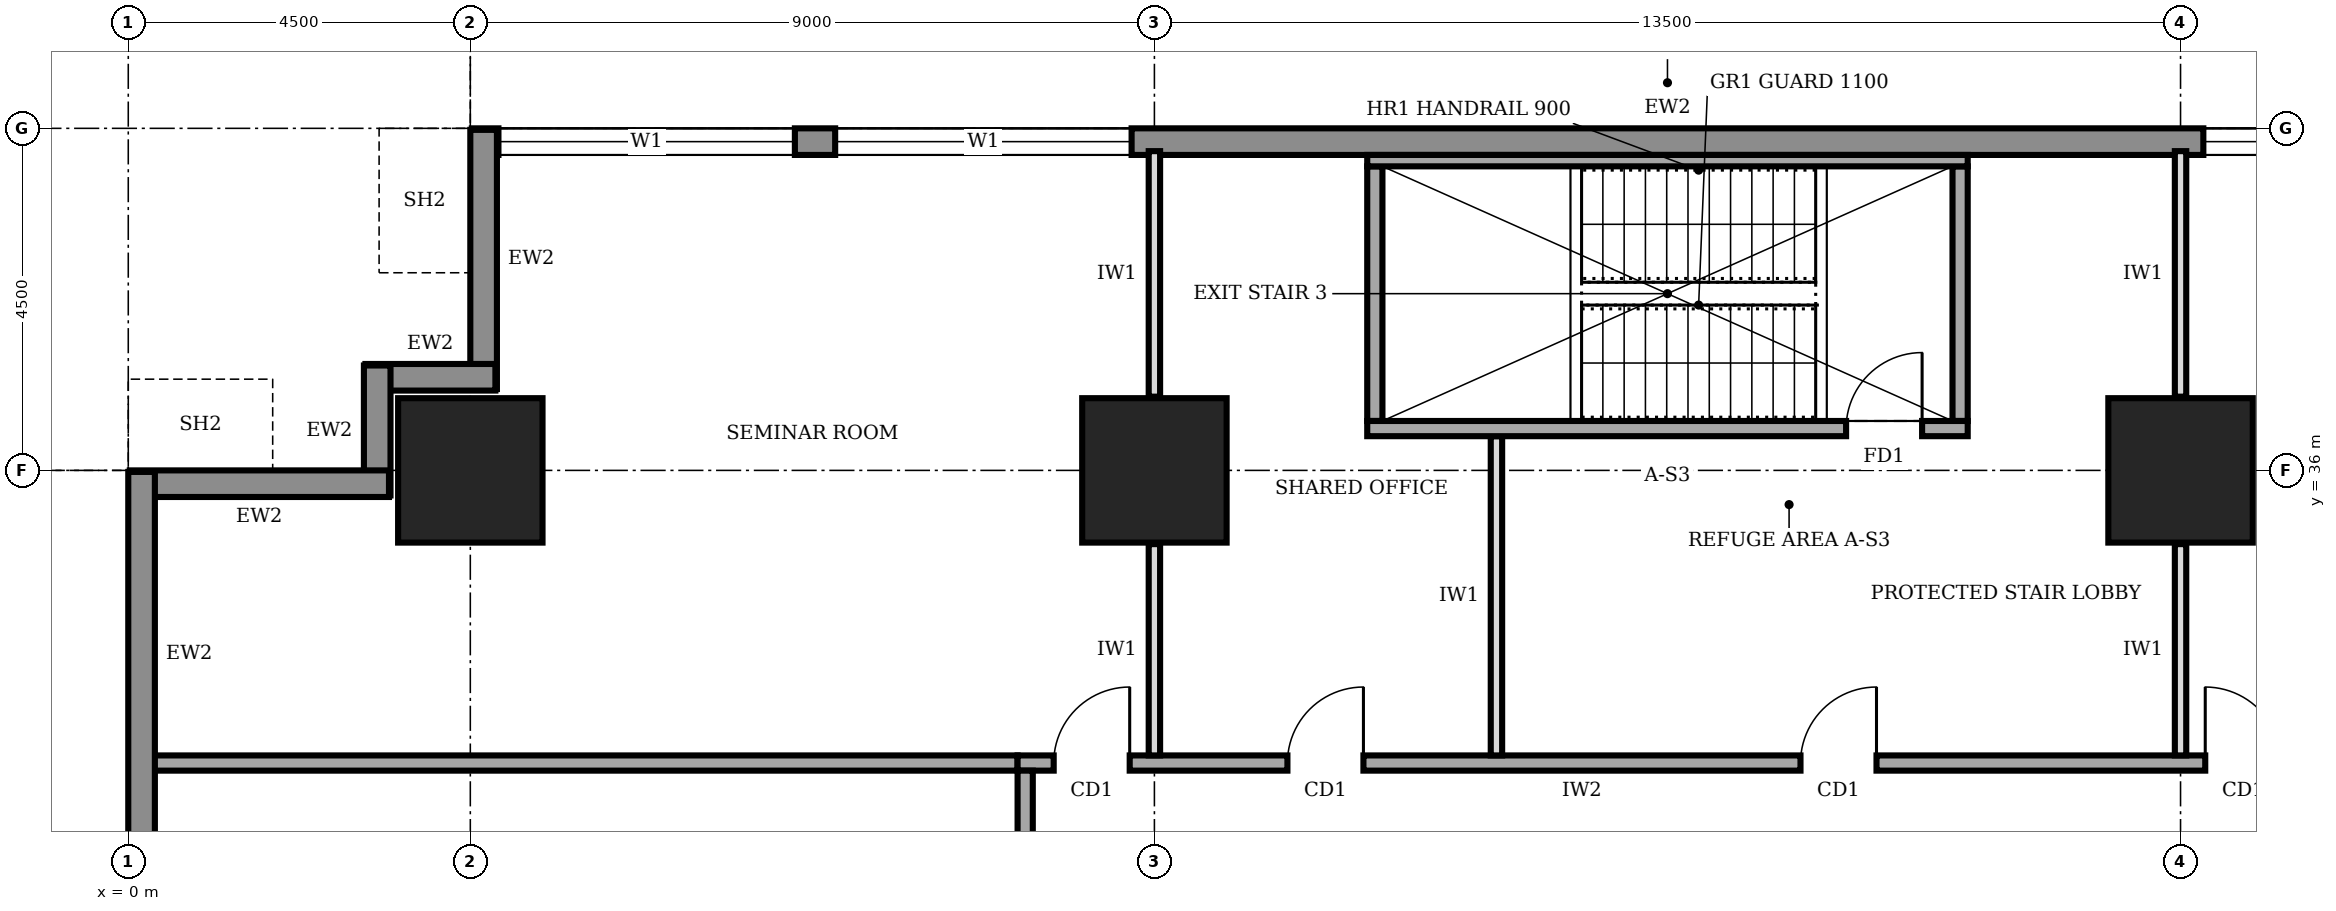
"""IFC4 building model, lengths in metres.
Left out: names, types, materials, properties, quantities, classifications, styles, units other than length and angle.
Written with IfcOpenShell. Run it as: python <this file> out.ifc"""

import sys

from ifc_helpers import new_model, si_unit, direction, frame, frame_2d, origin, origin_2d, place, context, subcontext, project, spatial, rectangle, extrude, element, fill, save


model = new_model("IFC4")
c1 = context("Model", 3, precision=1e-05, world=origin(), true_north=direction((0.0, 1.0)))
c2 = subcontext(c1, "Body", "Model", "MODEL_VIEW")
j1 = project(units=[si_unit("LENGTHUNIT", "METRE"), si_unit("PLANEANGLEUNIT", "RADIAN")], contexts=[c1])
p1 = place(None, origin())
s1 = spatial("IfcSite", under=j1, at=p1, CompositionType="ELEMENT")
p2 = place(p1, origin())
s2 = spatial("IfcBuilding", under=s1, at=p2, CompositionType="ELEMENT")
p3 = place(p2, frame((0.0, 0.0, 109.0)))
s3 = spatial("IfcBuildingStorey", under=s2, at=p3, CompositionType="ELEMENT", Elevation=109.0)
for number, where, z_axis, x_axis in (
    (1, (4.5, 36.0, 0.0), (0.0, 0.0, 1.0), (1.0, 0.0, 0.0)),
    (2, (13.5, 36.0, 0.0), (0.0, 0.0, 1.0), (1.0, 0.0, 0.0)),
    (3, (27.0, 36.0, 0.0), (0.0, 0.0, 1.0), (1.0, 0.0, 0.0)),
):
    element("IfcColumn", number, at=place(p3, frame(where, z_axis=z_axis, x_axis=x_axis)), inside=s3, PredefinedType="COLUMN", context=c2, shape_type="SweptSolid", body=[
        extrude(rectangle(XDim=1.9, YDim=1.9, at=origin_2d()), origin(), (0.0, 0.0, 1.0), 4.0),
    ])
p4 = place(p3, frame((35.98, 40.325, 0.0), z_axis=(0.0, 0.0, 1.0), x_axis=(-1.0, 0.0, 0.0)))
e4 = element("IfcWall", 4, at=p4, inside=s3, PredefinedType="STANDARD", context=c2, shape_type="SweptSolid", body=[
    extrude(rectangle(XDim=31.46, YDim=0.35, at=frame_2d((15.73, 0.0))), origin(), (0.0, 0.0, 1.0), 3.75),
])
p5 = place(p4, frame((27.21, 0.0, 0.9)))
e5 = element("IfcOpeningElement", 5, at=p5, cuts=e4, PredefinedType="OPENING", context=c2, shape_type="SweptSolid", body=[
    extrude(rectangle(XDim=3.9, YDim=2.2, at=frame_2d((1.95, 1.1))), frame((0.0, 0.185, 0.0), z_axis=(0.0, -1.0, 0.0), x_axis=(1.0, 0.0, 0.0)), (0.0, 0.0, 1.0), 0.37),
])
p6 = place(p4, frame((22.78, 0.0, 0.9)))
e6 = element("IfcOpeningElement", 6, at=p6, cuts=e4, PredefinedType="OPENING", context=c2, shape_type="SweptSolid", body=[
    extrude(rectangle(XDim=3.9, YDim=2.2, at=frame_2d((1.95, 1.1))), frame((0.0, 0.185, 0.0), z_axis=(0.0, -1.0, 0.0), x_axis=(1.0, 0.0, 0.0)), (0.0, 0.0, 1.0), 0.37),
])
p7 = place(p4, frame((4.78, 0.0, 0.9)))
e7 = element("IfcOpeningElement", 7, at=p7, cuts=e4, PredefinedType="OPENING", context=c2, shape_type="SweptSolid", body=[
    extrude(rectangle(XDim=3.9, YDim=2.2, at=frame_2d((1.95, 1.1))), frame((0.0, 0.185, 0.0), z_axis=(0.0, -1.0, 0.0), x_axis=(1.0, 0.0, 0.0)), (0.0, 0.0, 1.0), 0.37),
])
p8 = place(p3, frame((4.675, 40.48, 0.0), z_axis=(0.0, 0.0, 1.0), x_axis=(0.0, -1.0, 0.0)))
e8 = element("IfcWall", 8, at=p8, inside=s3, PredefinedType="STANDARD", context=c2, shape_type="SweptSolid", body=[
    extrude(rectangle(XDim=3.41, YDim=0.35, at=frame_2d((1.705, 0.0))), origin(), (0.0, 0.0, 1.0), 2.85),
])
for number, where, z_axis, x_axis in (
    (9, (4.83, 37.225, 0.0), (0.0, 0.0, 1.0), (-1.0, 0.0, 0.0)),
    (10, (3.275, 37.38, 0.0), (0.0, 0.0, 1.0), (0.0, -1.0, 0.0)),
):
    element("IfcWall", number, at=place(p3, frame(where, z_axis=z_axis, x_axis=x_axis)), inside=s3, PredefinedType="STANDARD", context=c2, shape_type="SweptSolid", body=[
        extrude(rectangle(XDim=1.71, YDim=0.35, at=frame_2d((0.855, 0.0))), origin(), (0.0, 0.0, 1.0), 3.75),
    ])
p9 = place(p3, frame((3.43, 35.825, 0.0), z_axis=(0.0, 0.0, 1.0), x_axis=(-1.0, 0.0, 0.0)))
e11 = element("IfcWall", 11, at=p9, inside=s3, PredefinedType="STANDARD", context=c2, shape_type="SweptSolid", body=[
    extrude(rectangle(XDim=3.41, YDim=0.35, at=frame_2d((1.705, 0.0))), origin(), (0.0, 0.0, 1.0), 2.85),
])
p10 = place(p3, frame((0.175, 35.98, 0.0), z_axis=(0.0, 0.0, 1.0), x_axis=(0.0, -1.0, 0.0)))
e12 = element("IfcWall", 12, at=p10, inside=s3, PredefinedType="STANDARD", context=c2, shape_type="SweptSolid", body=[
    extrude(rectangle(XDim=31.46, YDim=0.35, at=frame_2d((15.73, 0.0))), origin(), (0.0, 0.0, 1.0), 3.75),
])
p11 = place(p10, frame((27.21, 0.0, 0.9)))
e13 = element("IfcOpeningElement", 13, at=p11, cuts=e12, PredefinedType="OPENING", context=c2, shape_type="SweptSolid", body=[
    extrude(rectangle(XDim=3.9, YDim=2.2, at=frame_2d((1.95, 1.1))), frame((0.0, 0.185, 0.0), z_axis=(0.0, -1.0, 0.0), x_axis=(1.0, 0.0, 0.0)), (0.0, 0.0, 1.0), 0.37),
])
p12 = place(p10, frame((22.78, 0.0, 0.9)))
e14 = element("IfcOpeningElement", 14, at=p12, cuts=e12, PredefinedType="OPENING", context=c2, shape_type="SweptSolid", body=[
    extrude(rectangle(XDim=3.9, YDim=2.2, at=frame_2d((1.95, 1.1))), frame((0.0, 0.185, 0.0), z_axis=(0.0, -1.0, 0.0), x_axis=(1.0, 0.0, 0.0)), (0.0, 0.0, 1.0), 0.37),
])
p13 = place(p10, frame((18.28, 0.0, 0.9)))
e15 = element("IfcOpeningElement", 15, at=p13, cuts=e12, PredefinedType="OPENING", context=c2, shape_type="SweptSolid", body=[
    extrude(rectangle(XDim=3.9, YDim=2.2, at=frame_2d((1.95, 1.1))), frame((0.0, 0.185, 0.0), z_axis=(0.0, -1.0, 0.0), x_axis=(1.0, 0.0, 0.0)), (0.0, 0.0, 1.0), 0.37),
])
p14 = place(p10, frame((13.78, 0.0, 0.9)))
e16 = element("IfcOpeningElement", 16, at=p14, cuts=e12, PredefinedType="OPENING", context=c2, shape_type="SweptSolid", body=[
    extrude(rectangle(XDim=3.9, YDim=2.2, at=frame_2d((1.95, 1.1))), frame((0.0, 0.185, 0.0), z_axis=(0.0, -1.0, 0.0), x_axis=(1.0, 0.0, 0.0)), (0.0, 0.0, 1.0), 0.37),
])
p15 = place(p10, frame((9.28, 0.0, 0.9)))
e17 = element("IfcOpeningElement", 17, at=p15, cuts=e12, PredefinedType="OPENING", context=c2, shape_type="SweptSolid", body=[
    extrude(rectangle(XDim=3.9, YDim=2.2, at=frame_2d((1.95, 1.1))), frame((0.0, 0.185, 0.0), z_axis=(0.0, -1.0, 0.0), x_axis=(1.0, 0.0, 0.0)), (0.0, 0.0, 1.0), 0.37),
])
p16 = place(p10, frame((4.78, 0.0, 0.9)))
e18 = element("IfcOpeningElement", 18, at=p16, cuts=e12, PredefinedType="OPENING", context=c2, shape_type="SweptSolid", body=[
    extrude(rectangle(XDim=3.9, YDim=2.2, at=frame_2d((1.95, 1.1))), frame((0.0, 0.185, 0.0), z_axis=(0.0, -1.0, 0.0), x_axis=(1.0, 0.0, 0.0)), (0.0, 0.0, 1.0), 0.37),
])
p17 = place(p3, frame((28.6, 32.15, 0.0), z_axis=(0.0, 0.0, 1.0), x_axis=(-1.0, 0.0, 0.0)))
e19 = element("IfcWall", 19, at=p17, inside=s3, PredefinedType="SOLIDWALL", context=c2, shape_type="SweptSolid", body=[
    extrude(rectangle(XDim=16.9, YDim=0.2, at=frame_2d((8.45, 0.0))), origin(), (0.0, 0.0, 1.0), 3.75),
])
p18 = place(p17, frame((15.425, 0.0, 0.0)))
e20 = element("IfcOpeningElement", 20, at=p18, cuts=e19, PredefinedType="OPENING", context=c2, shape_type="SweptSolid", body=[
    extrude(rectangle(XDim=1.0, YDim=2.1, at=frame_2d((0.5, 1.05))), frame((0.0, 0.11, 0.0), z_axis=(0.0, -1.0, 0.0), x_axis=(1.0, 0.0, 0.0)), (0.0, 0.0, 1.0), 0.22),
])
p19 = place(p17, frame((12.35, 0.0, 0.0)))
e21 = element("IfcOpeningElement", 21, at=p19, cuts=e19, PredefinedType="OPENING", context=c2, shape_type="SweptSolid", body=[
    extrude(rectangle(XDim=1.0, YDim=2.1, at=frame_2d((0.5, 1.05))), frame((0.0, 0.11, 0.0), z_axis=(0.0, -1.0, 0.0), x_axis=(1.0, 0.0, 0.0)), (0.0, 0.0, 1.0), 0.22),
])
p20 = place(p17, frame((5.6, 0.0, 0.0)))
e22 = element("IfcOpeningElement", 22, at=p20, cuts=e19, PredefinedType="OPENING", context=c2, shape_type="SweptSolid", body=[
    extrude(rectangle(XDim=1.0, YDim=2.1, at=frame_2d((0.5, 1.05))), frame((0.0, 0.11, 0.0), z_axis=(0.0, -1.0, 0.0), x_axis=(1.0, 0.0, 0.0)), (0.0, 0.0, 1.0), 0.22),
])
p21 = place(p17, frame((0.275, 0.0, 0.0)))
e23 = element("IfcOpeningElement", 23, at=p21, cuts=e19, PredefinedType="OPENING", context=c2, shape_type="SweptSolid", body=[
    extrude(rectangle(XDim=1.0, YDim=2.1, at=frame_2d((0.5, 1.05))), frame((0.0, 0.11, 0.0), z_axis=(0.0, -1.0, 0.0), x_axis=(1.0, 0.0, 0.0)), (0.0, 0.0, 1.0), 0.22),
])
p22 = place(p3, frame((11.8, 32.05, 0.0), z_axis=(0.0, 0.0, 1.0), x_axis=(0.0, -1.0, 0.0)))
e24 = element("IfcWall", 24, at=p22, inside=s3, PredefinedType="SOLIDWALL", context=c2, shape_type="SweptSolid", body=[
    extrude(rectangle(XDim=23.8, YDim=0.2, at=frame_2d((11.9, 0.0))), origin(), (0.0, 0.0, 1.0), 3.75),
])
p23 = place(p22, frame((20.675, 0.0, 0.0)))
e25 = element("IfcOpeningElement", 25, at=p23, cuts=e24, PredefinedType="OPENING", context=c2, shape_type="SweptSolid", body=[
    extrude(rectangle(XDim=1.0, YDim=2.1, at=frame_2d((0.5, 1.05))), frame((0.0, 0.11, 0.0), z_axis=(0.0, -1.0, 0.0), x_axis=(1.0, 0.0, 0.0)), (0.0, 0.0, 1.0), 0.22),
])
p24 = place(p22, frame((16.9, 0.0, 0.0)))
e26 = element("IfcOpeningElement", 26, at=p24, cuts=e24, PredefinedType="OPENING", context=c2, shape_type="SweptSolid", body=[
    extrude(rectangle(XDim=0.9, YDim=2.1, at=frame_2d((0.45, 1.05))), frame((0.0, 0.11, 0.0), z_axis=(0.0, -1.0, 0.0), x_axis=(1.0, 0.0, 0.0)), (0.0, 0.0, 1.0), 0.22),
])
p25 = place(p22, frame((13.7, 0.0, 0.0)))
e27 = element("IfcOpeningElement", 27, at=p25, cuts=e24, PredefinedType="OPENING", context=c2, shape_type="SweptSolid", body=[
    extrude(rectangle(XDim=0.9, YDim=2.1, at=frame_2d((0.45, 1.05))), frame((0.0, 0.11, 0.0), z_axis=(0.0, -1.0, 0.0), x_axis=(1.0, 0.0, 0.0)), (0.0, 0.0, 1.0), 0.22),
])
p26 = place(p22, frame((8.15, 0.0, 0.0)))
e28 = element("IfcOpeningElement", 28, at=p26, cuts=e24, PredefinedType="OPENING", context=c2, shape_type="SweptSolid", body=[
    extrude(rectangle(XDim=0.9, YDim=2.1, at=frame_2d((0.45, 1.05))), frame((0.0, 0.11, 0.0), z_axis=(0.0, -1.0, 0.0), x_axis=(1.0, 0.0, 0.0)), (0.0, 0.0, 1.0), 0.22),
])
p27 = place(p22, frame((5.55, 0.0, 0.0)))
e29 = element("IfcOpeningElement", 29, at=p27, cuts=e24, PredefinedType="OPENING", context=c2, shape_type="SweptSolid", body=[
    extrude(rectangle(XDim=1.0, YDim=2.1, at=frame_2d((0.5, 1.05))), frame((0.0, 0.11, 0.0), z_axis=(0.0, -1.0, 0.0), x_axis=(1.0, 0.0, 0.0)), (0.0, 0.0, 1.0), 0.22),
])
p28 = place(p22, frame((10.65, 0.0, 0.0)))
e30 = element("IfcOpeningElement", 30, at=p28, cuts=e24, PredefinedType="OPENING", context=c2, shape_type="SweptSolid", body=[
    extrude(rectangle(XDim=1.0, YDim=2.1, at=frame_2d((0.5, 1.05))), frame((0.0, 0.11, 0.0), z_axis=(0.0, -1.0, 0.0), x_axis=(1.0, 0.0, 0.0)), (0.0, 0.0, 1.0), 0.22),
])
p29 = place(p22, frame((1.925, 0.0, 0.0)))
e31 = element("IfcOpeningElement", 31, at=p29, cuts=e24, PredefinedType="OPENING", context=c2, shape_type="SweptSolid", body=[
    extrude(rectangle(XDim=1.0, YDim=2.1, at=frame_2d((0.5, 1.05))), frame((0.0, 0.11, 0.0), z_axis=(0.0, -1.0, 0.0), x_axis=(1.0, 0.0, 0.0)), (0.0, 0.0, 1.0), 0.22),
])
p30 = place(p3, frame((0.3, 32.15, 0.0), z_axis=(0.0, 0.0, 1.0), x_axis=(1.0, 0.0, 0.0)))
e32 = element("IfcWall", 32, at=p30, inside=s3, PredefinedType="SOLIDWALL", context=c2, shape_type="SweptSolid", body=[
    extrude(rectangle(XDim=11.4, YDim=0.2, at=frame_2d((5.7, 0.0))), origin(), (0.0, 0.0, 1.0), 3.75),
])
p31 = place(p3, frame((13.5, 32.25, 0.0), z_axis=(0.0, 0.0, 1.0), x_axis=(0.0, 1.0, 0.0)))
e33 = element("IfcWall", 33, at=p31, inside=s3, PredefinedType="PARTITIONING", context=c2, shape_type="SweptSolid", body=[
    extrude(rectangle(XDim=2.78, YDim=0.15, at=frame_2d((1.39, 0.0))), origin(), (0.0, 0.0, 1.0), 2.85),
])
p32 = place(p3, frame((13.5, 36.97, 0.0), z_axis=(0.0, 0.0, 1.0), x_axis=(0.0, 1.0, 0.0)))
e34 = element("IfcWall", 34, at=p32, inside=s3, PredefinedType="PARTITIONING", context=c2, shape_type="SweptSolid", body=[
    extrude(rectangle(XDim=3.23, YDim=0.15, at=frame_2d((1.615, 0.0))), origin(), (0.0, 0.0, 1.0), 2.85),
])
p33 = place(p3, frame((18.0, 32.25, 0.0), z_axis=(0.0, 0.0, 1.0), x_axis=(0.0, 1.0, 0.0)))
e35 = element("IfcWall", 35, at=p33, inside=s3, PredefinedType="PARTITIONING", context=c2, shape_type="SweptSolid", body=[
    extrude(rectangle(XDim=4.2, YDim=0.15, at=frame_2d((2.1, 0.0))), origin(), (0.0, 0.0, 1.0), 3.75),
])
p34 = place(p3, frame((27.0, 32.25, 0.0), z_axis=(0.0, 0.0, 1.0), x_axis=(0.0, 1.0, 0.0)))
e36 = element("IfcWall", 36, at=p34, inside=s3, PredefinedType="PARTITIONING", context=c2, shape_type="SweptSolid", body=[
    extrude(rectangle(XDim=2.78, YDim=0.15, at=frame_2d((1.39, 0.0))), origin(), (0.0, 0.0, 1.0), 2.85),
])
p35 = place(p3, frame((27.0, 36.97, 0.0), z_axis=(0.0, 0.0, 1.0), x_axis=(0.0, 1.0, 0.0)))
e37 = element("IfcWall", 37, at=p35, inside=s3, PredefinedType="PARTITIONING", context=c2, shape_type="SweptSolid", body=[
    extrude(rectangle(XDim=3.23, YDim=0.15, at=frame_2d((1.615, 0.0))), origin(), (0.0, 0.0, 1.0), 2.85),
])
p36 = place(p3, frame((16.3, 36.55, 0.0), z_axis=(0.0, 0.0, 1.0), x_axis=(1.0, 0.0, 0.0)))
e38 = element("IfcWall", 38, at=p36, inside=s3, PredefinedType="SOLIDWALL", context=c2, shape_type="SweptSolid", body=[
    extrude(rectangle(XDim=7.9, YDim=0.2, at=frame_2d((3.95, 0.0))), origin(), (0.0, 0.0, 1.0), 3.75),
])
p37 = place(p36, frame((6.3, 0.0, 0.0)))
e39 = element("IfcOpeningElement", 39, at=p37, cuts=e38, PredefinedType="OPENING", context=c2, shape_type="SweptSolid", body=[
    extrude(rectangle(XDim=1.0, YDim=2.1, at=frame_2d((0.5, 1.05))), frame((0.0, 0.11, 0.0), z_axis=(0.0, -1.0, 0.0), x_axis=(1.0, 0.0, 0.0)), (0.0, 0.0, 1.0), 0.22),
])
p38 = place(p3, frame((16.3, 40.075, 0.0), z_axis=(0.0, 0.0, 1.0), x_axis=(1.0, 0.0, 0.0)))
e40 = element("IfcWall", 40, at=p38, inside=s3, PredefinedType="SOLIDWALL", context=c2, shape_type="SweptSolid", body=[
    extrude(rectangle(XDim=7.9, YDim=0.15, at=frame_2d((3.95, 0.0))), origin(), (0.0, 0.0, 1.0), 3.75),
])
for number, where, z_axis, x_axis in (
    (41, (16.4, 36.65, 0.0), (0.0, 0.0, 1.0), (0.0, 1.0, 0.0)),
    (42, (24.1, 36.65, 0.0), (0.0, 0.0, 1.0), (0.0, 1.0, 0.0)),
):
    element("IfcWall", number, at=place(p3, frame(where, z_axis=z_axis, x_axis=x_axis)), inside=s3, PredefinedType="SOLIDWALL", context=c2, shape_type="SweptSolid", body=[
        extrude(rectangle(XDim=3.35, YDim=0.2, at=frame_2d((1.675, 0.0))), origin(), (0.0, 0.0, 1.0), 3.75),
    ])
p39 = place(p5, origin())
e43 = element("IfcWindow", 43, at=p39, inside=s3, PartitioningType="SINGLE_PANEL", PredefinedType="WINDOW", context=c2, shape_type="SweptSolid", body=[
    extrude(rectangle(XDim=3.9, YDim=2.2, at=frame_2d((1.95, 1.1))), frame((0.0, 0.03, 0.0), z_axis=(0.0, -1.0, 0.0), x_axis=(1.0, 0.0, 0.0)), (0.0, 0.0, 1.0), 0.06),
])
fill(e5, e43)
p40 = place(p6, origin())
e44 = element("IfcWindow", 44, at=p40, inside=s3, PartitioningType="SINGLE_PANEL", PredefinedType="WINDOW", context=c2, shape_type="SweptSolid", body=[
    extrude(rectangle(XDim=3.9, YDim=2.2, at=frame_2d((1.95, 1.1))), frame((0.0, 0.03, 0.0), z_axis=(0.0, -1.0, 0.0), x_axis=(1.0, 0.0, 0.0)), (0.0, 0.0, 1.0), 0.06),
])
fill(e6, e44)
p41 = place(p7, origin())
e45 = element("IfcWindow", 45, at=p41, inside=s3, PartitioningType="SINGLE_PANEL", PredefinedType="WINDOW", context=c2, shape_type="SweptSolid", body=[
    extrude(rectangle(XDim=3.9, YDim=2.2, at=frame_2d((1.95, 1.1))), frame((0.0, 0.03, 0.0), z_axis=(0.0, -1.0, 0.0), x_axis=(1.0, 0.0, 0.0)), (0.0, 0.0, 1.0), 0.06),
])
fill(e7, e45)
p42 = place(p18, frame((1.0, 0.0, 0.0), z_axis=(0.0, 0.0, 1.0), x_axis=(-1.0, 0.0, 0.0)))
e46 = element("IfcDoor", 46, at=p42, inside=s3, OperationType="SINGLE_SWING_RIGHT", PredefinedType="DOOR", context=c2, shape_type="SweptSolid", body=[
    extrude(rectangle(XDim=1.0, YDim=2.1, at=frame_2d((0.5, 1.05))), frame((0.0, 0.025, 0.0), z_axis=(0.0, -1.0, 0.0), x_axis=(1.0, 0.0, 0.0)), (0.0, 0.0, 1.0), 0.05),
])
fill(e20, e46)
p43 = place(p19, frame((1.0, 0.0, 0.0), z_axis=(0.0, 0.0, 1.0), x_axis=(-1.0, 0.0, 0.0)))
e47 = element("IfcDoor", 47, at=p43, inside=s3, OperationType="SINGLE_SWING_RIGHT", PredefinedType="DOOR", context=c2, shape_type="SweptSolid", body=[
    extrude(rectangle(XDim=1.0, YDim=2.1, at=frame_2d((0.5, 1.05))), frame((0.0, 0.025, 0.0), z_axis=(0.0, -1.0, 0.0), x_axis=(1.0, 0.0, 0.0)), (0.0, 0.0, 1.0), 0.05),
])
fill(e21, e47)
p44 = place(p20, frame((1.0, 0.0, 0.0), z_axis=(0.0, 0.0, 1.0), x_axis=(-1.0, 0.0, 0.0)))
e48 = element("IfcDoor", 48, at=p44, inside=s3, OperationType="SINGLE_SWING_RIGHT", PredefinedType="DOOR", context=c2, shape_type="SweptSolid", body=[
    extrude(rectangle(XDim=1.0, YDim=2.1, at=frame_2d((0.5, 1.05))), frame((0.0, 0.025, 0.0), z_axis=(0.0, -1.0, 0.0), x_axis=(1.0, 0.0, 0.0)), (0.0, 0.0, 1.0), 0.05),
])
fill(e22, e48)
p45 = place(p21, frame((1.0, 0.0, 0.0), z_axis=(0.0, 0.0, 1.0), x_axis=(-1.0, 0.0, 0.0)))
e49 = element("IfcDoor", 49, at=p45, inside=s3, OperationType="SINGLE_SWING_LEFT", PredefinedType="DOOR", context=c2, shape_type="SweptSolid", body=[
    extrude(rectangle(XDim=1.0, YDim=2.1, at=frame_2d((0.5, 1.05))), frame((0.0, 0.025, 0.0), z_axis=(0.0, -1.0, 0.0), x_axis=(1.0, 0.0, 0.0)), (0.0, 0.0, 1.0), 0.05),
])
fill(e23, e49)
p46 = place(p37, origin())
e50 = element("IfcDoor", 50, at=p46, inside=s3, OperationType="SINGLE_SWING_RIGHT", PredefinedType="DOOR", context=c2, shape_type="SweptSolid", body=[
    extrude(rectangle(XDim=1.0, YDim=2.1, at=frame_2d((0.5, 1.05))), frame((0.0, 0.025, 0.0), z_axis=(0.0, -1.0, 0.0), x_axis=(1.0, 0.0, 0.0)), (0.0, 0.0, 1.0), 0.05),
])
fill(e39, e50)
save(model, sys.argv[1])
